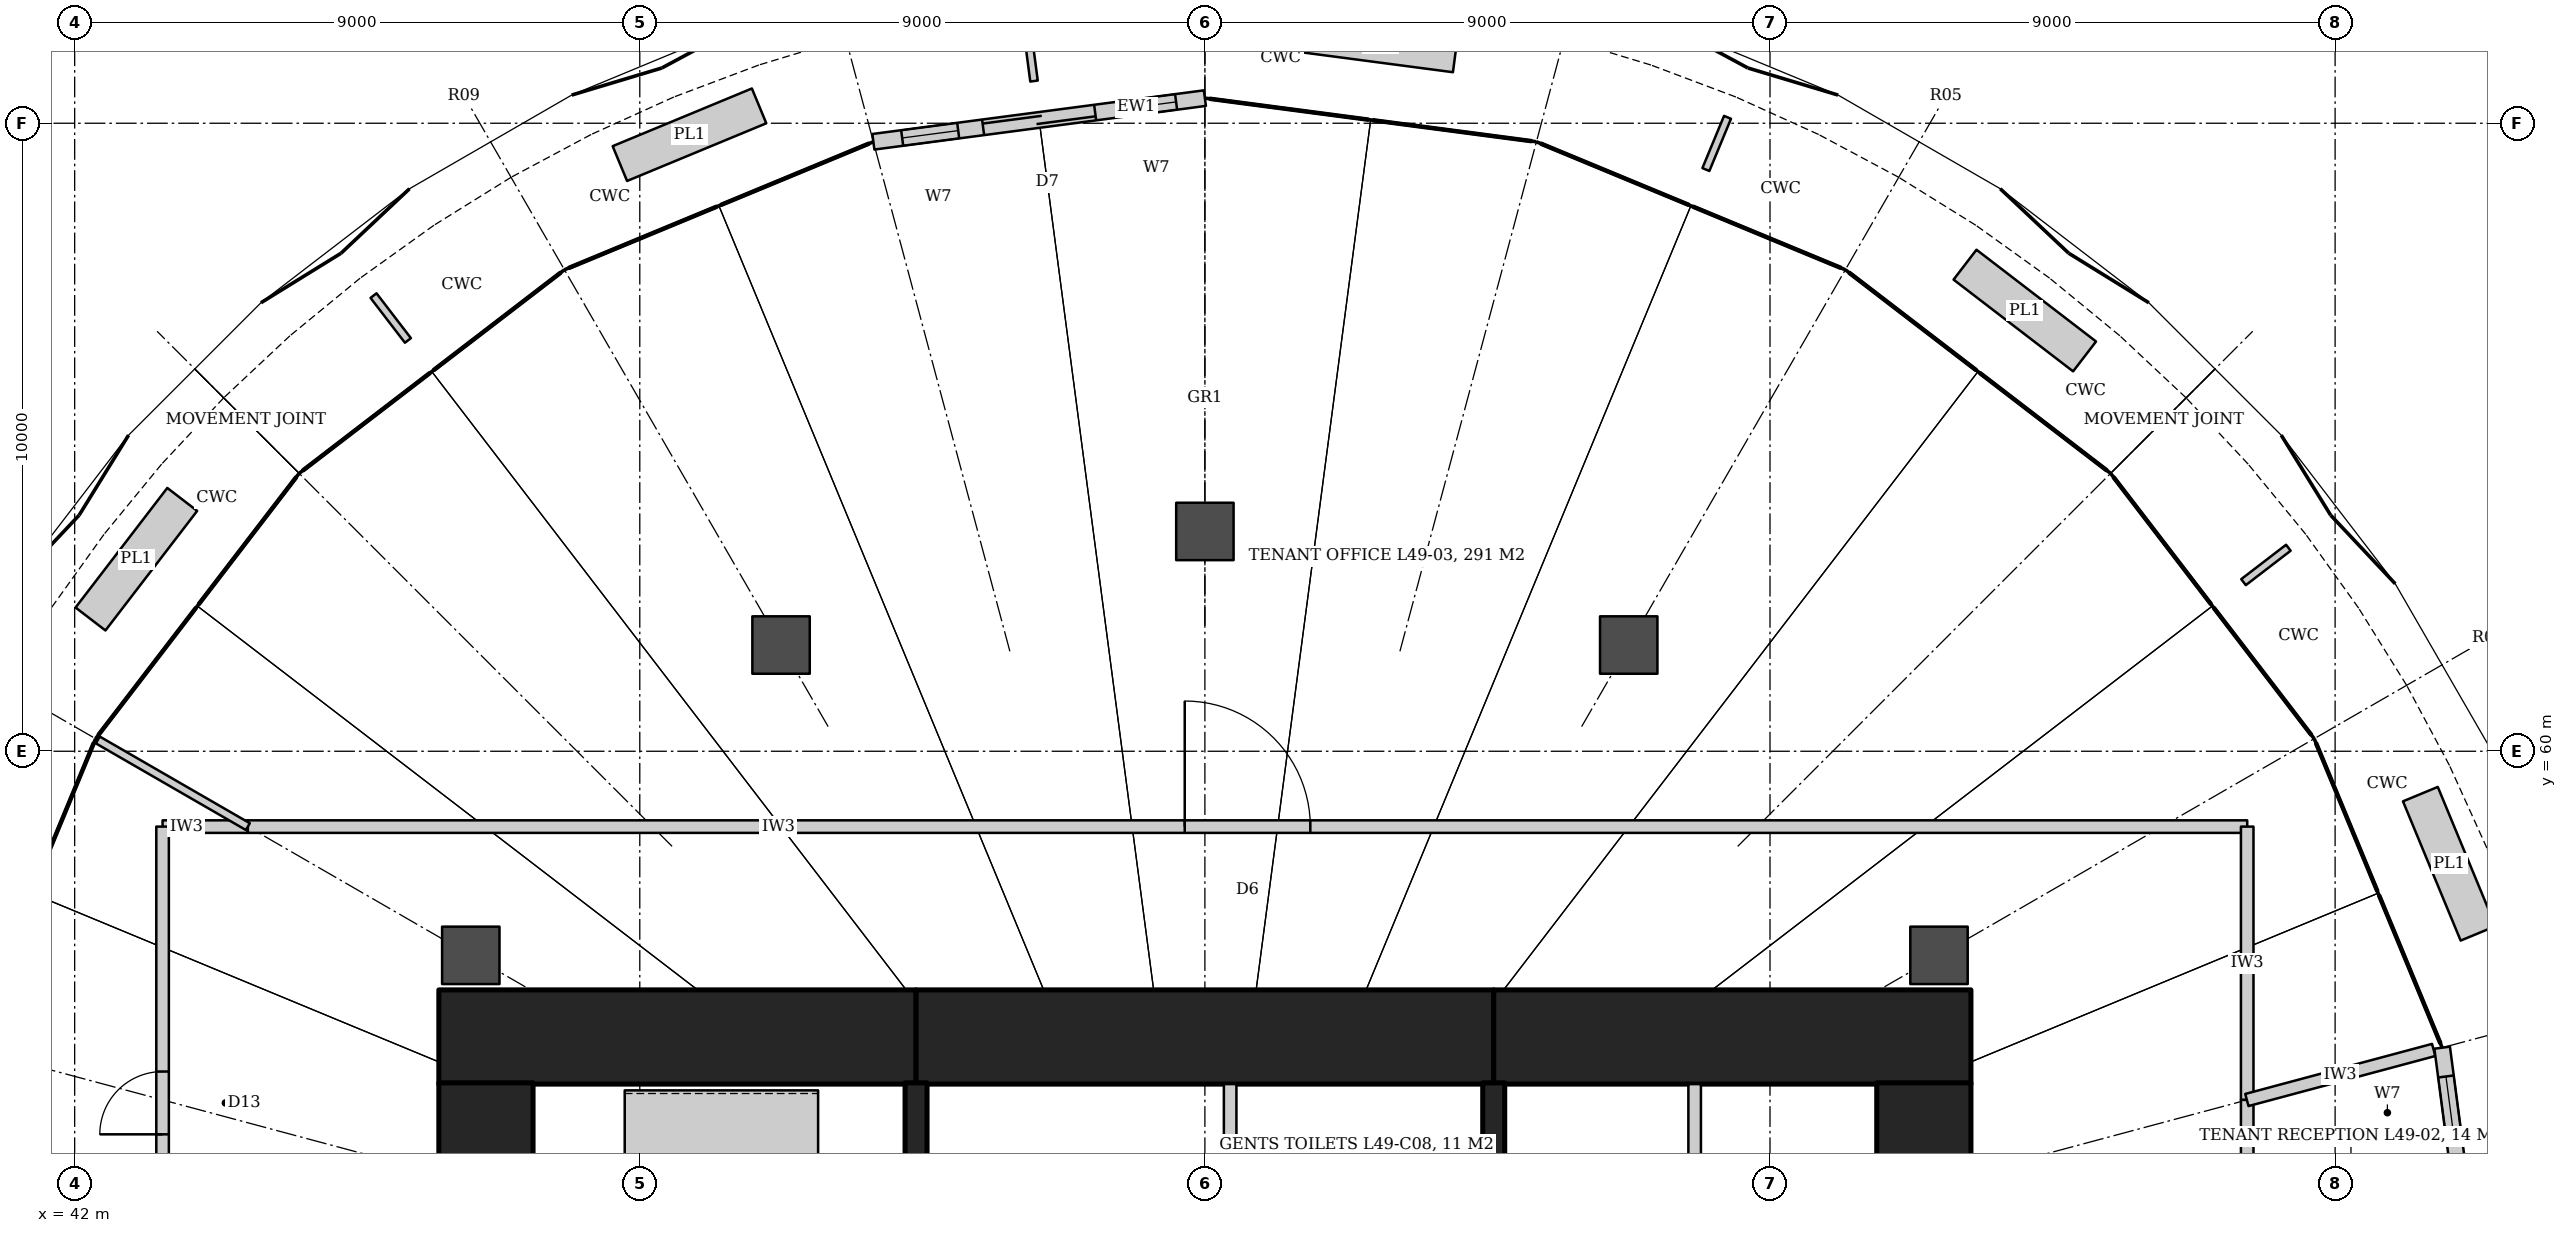
"""IFC4 building model, lengths in metres.
Left out: names, types, materials, properties, quantities, classifications, styles, units other than length and angle.
Written with IfcOpenShell. Run it as: python <this file> out.ifc"""

import sys

from ifc_helpers import new_model, si_unit, direction, frame, frame_2d, origin, origin_2d, place, context, subcontext, project, spatial, rectangle, hollow_circle, extrude, element, fill, save


model = new_model("IFC4")
c1 = context("Model", 3, precision=1e-05, world=origin(), true_north=direction((0.0, 1.0)))
c2 = subcontext(c1, "Body", "Model", "MODEL_VIEW")
j1 = project(units=[si_unit("LENGTHUNIT", "METRE"), si_unit("PLANEANGLEUNIT", "RADIAN")], contexts=[c1])
p1 = place(None, origin())
s1 = spatial("IfcSite", under=j1, at=p1, CompositionType="ELEMENT")
p2 = place(p1, origin())
s2 = spatial("IfcBuilding", under=s1, at=p2, CompositionType="ELEMENT")
p3 = place(p2, frame((0.0, 0.0, 215.0)))
s3 = spatial("IfcBuildingStorey", under=s2, at=p3, CompositionType="ELEMENT", Elevation=215.0)
p4 = place(p3, frame((47.8, 55.45, 0.0), z_axis=(0.0, 0.0, 1.0), x_axis=(1.0, 0.0, 0.0)))
e1 = element("IfcWall", 1, at=p4, inside=s3, PredefinedType="SHEAR", context=c2, shape_type="SweptSolid", body=[
    extrude(rectangle(XDim=7.6, YDim=1.5, at=frame_2d((3.8, 0.0))), origin(), (0.0, 0.0, 1.0), 4.2),
])
p5 = place(p3, frame((55.4, 55.45, 0.0), z_axis=(0.0, 0.0, 1.0), x_axis=(1.0, 0.0, 0.0)))
e2 = element("IfcWall", 2, at=p5, inside=s3, PredefinedType="SHEAR", context=c2, shape_type="SweptSolid", body=[
    extrude(rectangle(XDim=9.2, YDim=1.5, at=frame_2d((4.6, 0.0))), origin(), (0.0, 0.0, 1.0), 4.2),
])
p6 = place(p3, frame((64.6, 55.45, 0.0), z_axis=(0.0, 0.0, 1.0), x_axis=(1.0, 0.0, 0.0)))
e3 = element("IfcWall", 3, at=p6, inside=s3, PredefinedType="SHEAR", context=c2, shape_type="SweptSolid", body=[
    extrude(rectangle(XDim=7.6, YDim=1.5, at=frame_2d((3.8, 0.0))), origin(), (0.0, 0.0, 1.0), 4.2),
])
for number, where, z_axis, x_axis in (
    (4, (71.45, 51.5, 0.0), (0.0, 0.0, 1.0), (0.0, 1.0, 0.0)),
    (5, (48.55, 51.5, 0.0), (0.0, 0.0, 1.0), (0.0, 1.0, 0.0)),
):
    element("IfcWall", number, at=place(p3, frame(where, z_axis=z_axis, x_axis=x_axis)), inside=s3, PredefinedType="SHEAR", context=c2, shape_type="SweptSolid", body=[
        extrude(rectangle(XDim=3.22, YDim=1.5, at=frame_2d((1.61, 0.0))), origin(), (0.0, 0.0, 1.0), 4.2),
    ])
for number, where, z_axis, x_axis in (
    (6, (55.4, 51.655, 0.0), (0.0, 0.0, 1.0), (0.0, 1.0, 0.0)),
    (7, (64.6, 51.655, 0.0), (0.0, 0.0, 1.0), (0.0, 1.0, 0.0)),
):
    element("IfcWall", number, at=place(p3, frame(where, z_axis=z_axis, x_axis=x_axis)), inside=s3, PredefinedType="SHEAR", context=c2, shape_type="SweptSolid", body=[
        extrude(rectangle(XDim=3.065, YDim=0.35, at=frame_2d((1.532, 0.0))), origin(), (0.0, 0.0, 1.0), 4.2),
    ])
for number, where, z_axis, x_axis in (
    (8, (71.691, 56.75, 0.0), (0.0, 0.0, 1.0), (1.0, 0.0, 0.0)),
    (9, (66.75, 61.691, 0.0), (0.0, 0.0, 1.0), (1.0, 0.0, 0.0)),
    (10, (60.0, 63.5, 0.0), (0.0, 0.0, 1.0), (1.0, 0.0, 0.0)),
    (11, (53.25, 61.691, 0.0), (0.0, 0.0, 1.0), (1.0, 0.0, 0.0)),
    (12, (48.309, 56.75, 0.0), (0.0, 0.0, 1.0), (1.0, 0.0, 0.0)),
):
    element("IfcColumn", number, at=place(p3, frame(where, z_axis=z_axis, x_axis=x_axis)), inside=s3, PredefinedType="COLUMN", context=c2, shape_type="SweptSolid", body=[
        extrude(hollow_circle(Radius=0.457, WallThickness=0.045, at=origin_2d()), origin(), (0.0, 0.0, 1.0), 4.2),
    ])
p7 = place(p3, frame((43.4, 58.8, 0.0), z_axis=(0.0, 0.0, 1.0), x_axis=(1.0, 0.0, 0.0)))
e13 = element("IfcWall", 13, at=p7, inside=s3, PredefinedType="PARTITIONING", context=c2, shape_type="SweptSolid", body=[
    extrude(rectangle(XDim=1.358, YDim=0.2, at=frame_2d((0.679, 0.0))), origin(), (0.0, 0.0, 1.0), 3.04),
])
p8 = place(p3, frame((44.758, 58.8, 0.0), z_axis=(0.0, 0.0, 1.0), x_axis=(1.0, 0.0, 0.0)))
e14 = element("IfcWall", 14, at=p8, inside=s3, PredefinedType="PARTITIONING", context=c2, shape_type="SweptSolid", body=[
    extrude(rectangle(XDim=31.842, YDim=0.2, at=frame_2d((15.921, 0.0))), origin(), (0.0, 0.0, 1.0), 3.012),
])
p9 = place(p8, frame((14.921, 0.0, 0.0)))
e15 = element("IfcOpeningElement", 15, at=p9, cuts=e14, PredefinedType="OPENING", context=c2, shape_type="SweptSolid", body=[
    extrude(rectangle(XDim=2.0, YDim=2.1, at=frame_2d((1.0, 1.05))), frame((0.0, 0.11, 0.0), z_axis=(0.0, -1.0, 0.0), x_axis=(1.0, 0.0, 0.0)), (0.0, 0.0, 1.0), 0.22),
])
p10 = place(p3, frame((76.6, 58.8, 0.0), z_axis=(0.0, 0.0, 1.0), x_axis=(0.0, -1.0, 0.0)))
e16 = element("IfcWall", 16, at=p10, inside=s3, PredefinedType="PARTITIONING", context=c2, shape_type="SweptSolid", body=[
    extrude(rectangle(XDim=4.352, YDim=0.2, at=frame_2d((2.176, 0.0))), origin(), (0.0, 0.0, 1.0), 3.012),
])
p11 = place(p3, frame((76.6, 54.448, 0.0), z_axis=(0.0, 0.0, 1.0), x_axis=(0.0, -1.0, 0.0)))
e17 = element("IfcWall", 17, at=p11, inside=s3, PredefinedType="PARTITIONING", context=c2, shape_type="SweptSolid", body=[
    extrude(rectangle(XDim=4.448, YDim=0.2, at=frame_2d((2.224, 0.0))), origin(), (0.0, 0.0, 1.0), 3.012),
])
p12 = place(p11, frame((1.424, 0.0, 0.0)))
e18 = element("IfcOpeningElement", 18, at=p12, cuts=e17, PredefinedType="OPENING", context=c2, shape_type="SweptSolid", body=[
    extrude(rectangle(XDim=1.6, YDim=2.4, at=frame_2d((0.8, 1.2))), frame((0.0, 0.11, 0.0), z_axis=(0.0, -1.0, 0.0), x_axis=(1.0, 0.0, 0.0)), (0.0, 0.0, 1.0), 0.22),
])
p13 = place(p3, frame((43.4, 50.0, 0.0), z_axis=(0.0, 0.0, 1.0), x_axis=(0.0, 1.0, 0.0)))
e19 = element("IfcWall", 19, at=p13, inside=s3, PredefinedType="PARTITIONING", context=c2, shape_type="SweptSolid", body=[
    extrude(rectangle(XDim=8.8, YDim=0.2, at=frame_2d((4.4, 0.0))), origin(), (0.0, 0.0, 1.0), 3.012),
])
p14 = place(p13, frame((3.9, 0.0, 0.0)))
e20 = element("IfcOpeningElement", 20, at=p14, cuts=e19, PredefinedType="OPENING", context=c2, shape_type="SweptSolid", body=[
    extrude(rectangle(XDim=1.0, YDim=2.4, at=frame_2d((0.5, 1.2))), frame((0.0, 0.11, 0.0), z_axis=(0.0, -1.0, 0.0), x_axis=(1.0, 0.0, 0.0)), (0.0, 0.0, 1.0), 0.22),
])
p15 = place(p3, frame((76.594, 54.447, 0.0), z_axis=(0.0, 0.0, 1.0), x_axis=(0.9659303613, 0.258802119616, 0.0)))
e21 = element("IfcWall", 21, at=p15, inside=s3, PredefinedType="PARTITIONING", context=c2, shape_type="SweptSolid", body=[
    extrude(rectangle(XDim=3.08, YDim=0.2, at=frame_2d((1.54, 0.0))), origin(), (0.0, 0.0, 1.0), 3.04),
])
p16 = place(p3, frame((44.758, 58.8, 0.0), z_axis=(0.0, 0.0, 1.0), x_axis=(-0.866057440993, 0.499944505821, 0.0)))
e22 = element("IfcWall", 22, at=p16, inside=s3, PredefinedType="PARTITIONING", context=c2, shape_type="SweptSolid", body=[
    extrude(rectangle(XDim=2.76, YDim=0.125, at=frame_2d((1.38, 0.0))), origin(), (0.0, 0.0, 1.0), 3.04),
])
p17 = place(p3, frame((80.4, 50.0, 0.0), z_axis=(0.0, 0.0, 1.0), x_axis=(-0.130514991371, 0.991446335929, 0.0)))
e23 = element("IfcWall", 23, at=p17, inside=s3, PredefinedType="SOLIDWALL", context=c2, shape_type="SweptSolid", body=[
    extrude(rectangle(XDim=5.326, YDim=0.25, at=frame_2d((2.663, 0.0))), origin(), (0.0, 0.0, 1.0), 4.04),
])
p18 = place(p17, frame((1.763, 0.0, 0.0)))
e24 = element("IfcOpeningElement", 24, at=p18, cuts=e23, PredefinedType="OPENING", context=c2, shape_type="SweptSolid", body=[
    extrude(rectangle(XDim=1.8, YDim=2.4, at=frame_2d((0.9, 1.2))), frame((0.0, 0.135, 0.0), z_axis=(0.0, -1.0, 0.0), x_axis=(1.0, 0.0, 0.0)), (0.0, 0.0, 1.0), 0.27),
])
p19 = place(p17, frame((0.463, 0.0, 0.0)))
e25 = element("IfcOpeningElement", 25, at=p19, cuts=e23, PredefinedType="OPENING", context=c2, shape_type="SweptSolid", body=[
    extrude(rectangle(XDim=0.9, YDim=2.4, at=frame_2d((0.45, 1.2))), frame((0.0, 0.135, 0.0), z_axis=(0.0, -1.0, 0.0), x_axis=(1.0, 0.0, 0.0)), (0.0, 0.0, 1.0), 0.27),
])
p20 = place(p17, frame((3.963, 0.0, 0.0)))
e26 = element("IfcOpeningElement", 26, at=p20, cuts=e23, PredefinedType="OPENING", context=c2, shape_type="SweptSolid", body=[
    extrude(rectangle(XDim=0.9, YDim=2.4, at=frame_2d((0.45, 1.2))), frame((0.0, 0.135, 0.0), z_axis=(0.0, -1.0, 0.0), x_axis=(1.0, 0.0, 0.0)), (0.0, 0.0, 1.0), 0.27),
])
p21 = place(p3, frame((60.0, 70.4, 0.0), z_axis=(0.0, 0.0, 1.0), x_axis=(-0.991446335929, -0.130514991371, 0.0)))
e27 = element("IfcWall", 27, at=p21, inside=s3, PredefinedType="SOLIDWALL", context=c2, shape_type="SweptSolid", body=[
    extrude(rectangle(XDim=5.326, YDim=0.25, at=frame_2d((2.663, 0.0))), origin(), (0.0, 0.0, 1.0), 4.04),
])
p22 = place(p21, frame((1.763, 0.0, 0.0)))
e28 = element("IfcOpeningElement", 28, at=p22, cuts=e27, PredefinedType="OPENING", context=c2, shape_type="SweptSolid", body=[
    extrude(rectangle(XDim=1.8, YDim=2.4, at=frame_2d((0.9, 1.2))), frame((0.0, 0.135, 0.0), z_axis=(0.0, -1.0, 0.0), x_axis=(1.0, 0.0, 0.0)), (0.0, 0.0, 1.0), 0.27),
])
p23 = place(p21, frame((0.463, 0.0, 0.0)))
e29 = element("IfcOpeningElement", 29, at=p23, cuts=e27, PredefinedType="OPENING", context=c2, shape_type="SweptSolid", body=[
    extrude(rectangle(XDim=0.9, YDim=2.4, at=frame_2d((0.45, 1.2))), frame((0.0, 0.135, 0.0), z_axis=(0.0, -1.0, 0.0), x_axis=(1.0, 0.0, 0.0)), (0.0, 0.0, 1.0), 0.27),
])
p24 = place(p21, frame((3.963, 0.0, 0.0)))
e30 = element("IfcOpeningElement", 30, at=p24, cuts=e27, PredefinedType="OPENING", context=c2, shape_type="SweptSolid", body=[
    extrude(rectangle(XDim=0.9, YDim=2.4, at=frame_2d((0.45, 1.2))), frame((0.0, 0.135, 0.0), z_axis=(0.0, -1.0, 0.0), x_axis=(1.0, 0.0, 0.0)), (0.0, 0.0, 1.0), 0.27),
])
p25 = place(p3, frame((67.8, 51.675, 0.0), z_axis=(0.0, 0.0, 1.0), x_axis=(0.0, 1.0, 0.0)))
e31 = element("IfcWall", 31, at=p25, inside=s3, PredefinedType="PARTITIONING", context=c2, shape_type="SweptSolid", body=[
    extrude(rectangle(XDim=3.025, YDim=0.2, at=frame_2d((1.512, 0.0))), origin(), (0.0, 0.0, 1.0), 4.2),
])
p26 = place(p3, frame((60.402, 51.675, 0.0), z_axis=(0.0, 0.0, 1.0), x_axis=(0.0, 1.0, 0.0)))
e32 = element("IfcWall", 32, at=p26, inside=s3, PredefinedType="PARTITIONING", context=c2, shape_type="SweptSolid", body=[
    extrude(rectangle(XDim=3.025, YDim=0.2, at=frame_2d((1.512, 0.0))), origin(), (0.0, 0.0, 1.0), 4.04),
])
p27 = place(p9, origin())
e33 = element("IfcDoor", 33, at=p27, inside=s3, OperationType="DOUBLE_DOOR_DOUBLE_SWING", PredefinedType="DOOR", context=c2, shape_type="SweptSolid", body=[
    extrude(rectangle(XDim=2.0, YDim=2.1, at=frame_2d((1.0, 1.05))), frame((0.0, 0.025, 0.0), z_axis=(0.0, -1.0, 0.0), x_axis=(1.0, 0.0, 0.0)), (0.0, 0.0, 1.0), 0.05),
])
fill(e15, e33)
p28 = place(p14, origin())
e34 = element("IfcDoor", 34, at=p28, inside=s3, OperationType="SINGLE_SWING_LEFT", PredefinedType="DOOR", context=c2, shape_type="SweptSolid", body=[
    extrude(rectangle(XDim=1.0, YDim=2.4, at=frame_2d((0.5, 1.2))), frame((0.0, 0.025, 0.0), z_axis=(0.0, -1.0, 0.0), x_axis=(1.0, 0.0, 0.0)), (0.0, 0.0, 1.0), 0.05),
])
fill(e20, e34)
p29 = place(p20, origin())
e35 = element("IfcWindow", 35, at=p29, inside=s3, PartitioningType="SINGLE_PANEL", PredefinedType="WINDOW", context=c2, shape_type="SweptSolid", body=[
    extrude(rectangle(XDim=0.9, YDim=2.4, at=frame_2d((0.45, 1.2))), frame((0.0, 0.03, 0.0), z_axis=(0.0, -1.0, 0.0), x_axis=(1.0, 0.0, 0.0)), (0.0, 0.0, 1.0), 0.06),
])
fill(e26, e35)
p30 = place(p22, origin())
e36 = element("IfcDoor", 36, at=p30, inside=s3, OperationType="DOUBLE_DOOR_SLIDING", PredefinedType="DOOR", context=c2, shape_type="SweptSolid", body=[
    extrude(rectangle(XDim=1.8, YDim=2.4, at=frame_2d((0.9, 1.2))), frame((0.0, 0.025, 0.0), z_axis=(0.0, -1.0, 0.0), x_axis=(1.0, 0.0, 0.0)), (0.0, 0.0, 1.0), 0.05),
])
fill(e28, e36)
p31 = place(p23, origin())
e37 = element("IfcWindow", 37, at=p31, inside=s3, PartitioningType="SINGLE_PANEL", PredefinedType="WINDOW", context=c2, shape_type="SweptSolid", body=[
    extrude(rectangle(XDim=0.9, YDim=2.4, at=frame_2d((0.45, 1.2))), frame((0.0, 0.03, 0.0), z_axis=(0.0, -1.0, 0.0), x_axis=(1.0, 0.0, 0.0)), (0.0, 0.0, 1.0), 0.06),
])
fill(e29, e37)
p32 = place(p24, origin())
e38 = element("IfcWindow", 38, at=p32, inside=s3, PartitioningType="SINGLE_PANEL", PredefinedType="WINDOW", context=c2, shape_type="SweptSolid", body=[
    extrude(rectangle(XDim=0.9, YDim=2.4, at=frame_2d((0.45, 1.2))), frame((0.0, 0.03, 0.0), z_axis=(0.0, -1.0, 0.0), x_axis=(1.0, 0.0, 0.0)), (0.0, 0.0, 1.0), 0.06),
])
fill(e30, e38)
save(model, sys.argv[1])
